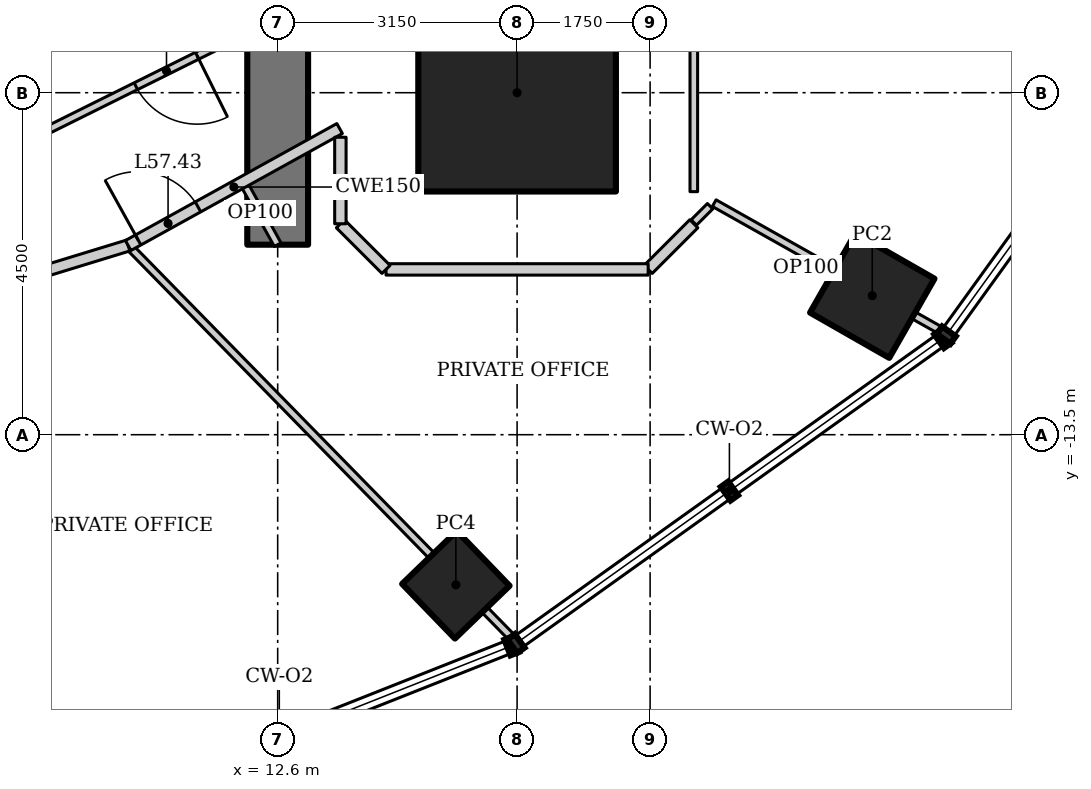
"""IFC4 building model, lengths in metres.
Left out: names, types, materials, properties, quantities, classifications, styles, units other than length and angle.
Written with IfcOpenShell. Run it as: python <this file> out.ifc"""

import sys

from ifc_helpers import new_model, si_unit, direction, frame, frame_2d, origin, origin_2d, place, context, subcontext, project, spatial, rectangle, hollow_rectangle, extrude, element, fill, save


model = new_model("IFC4")
c1 = context("Model", 3, precision=1e-05, world=origin(), true_north=direction((0.0, 1.0)))
c2 = subcontext(c1, "Body", "Model", "MODEL_VIEW")
j1 = project(units=[si_unit("LENGTHUNIT", "METRE"), si_unit("PLANEANGLEUNIT", "RADIAN")], contexts=[c1])
p1 = place(None, origin())
s1 = spatial("IfcSite", under=j1, at=p1, CompositionType="ELEMENT")
p2 = place(p1, origin())
s2 = spatial("IfcBuilding", under=s1, at=p2, CompositionType="ELEMENT")
p3 = place(p2, frame((0.0, 0.0, 245.2)))
s3 = spatial("IfcBuildingStorey", under=s2, at=p3, CompositionType="ELEMENT", Elevation=245.2)
p4 = place(p3, frame((15.75, -9.0, 0.0), z_axis=(0.0, 0.0, 1.0), x_axis=(1.0, 0.0, 0.0)))
e1 = element("IfcColumn", 1, at=p4, inside=s3, PredefinedType="COLUMN", context=c2, shape_type="SweptSolid", body=[
    extrude(hollow_rectangle(XDim=2.6, YDim=2.6, WallThickness=0.13, at=origin_2d()), origin(), (0.0, 0.0, 1.0), 4.2),
])
for number, where, z_axis, x_axis in (
    (2, (9.035, -17.731, 0.0), (0.0, 0.0, 1.0), (0.891, 0.454, 0.0)),
    (3, (14.944, -15.475, 0.0), (0.0, 0.0, 1.0), (0.719, 0.695, 0.0)),
):
    element("IfcColumn", number, at=place(p3, frame(where, z_axis=z_axis, x_axis=x_axis)), inside=s3, PredefinedType="COLUMN", context=c2, shape_type="SweptSolid", body=[
        extrude(hollow_rectangle(XDim=1.0, YDim=1.0, WallThickness=0.08, at=origin_2d()), origin(), (0.0, 0.0, 1.0), 4.2),
    ])
p5 = place(p3, frame((20.423, -11.67, 0.0), z_axis=(0.0, 0.0, 1.0), x_axis=(0.496139221777, 0.86824298017, 0.0)))
e4 = element("IfcColumn", 4, at=p5, inside=s3, PredefinedType="COLUMN", context=c2, shape_type="SweptSolid", body=[
    extrude(hollow_rectangle(XDim=1.2, YDim=1.2, WallThickness=0.1, at=origin_2d()), origin(), (0.0, 0.0, 1.0), 4.2),
])
p6 = place(p3, frame((12.6, -11.0, 0.0), z_axis=(0.0, 0.0, 1.0), x_axis=(0.0, 1.0, 0.0)))
e5 = element("IfcWall", 5, at=p6, inside=s3, PredefinedType="SHEAR", context=c2, shape_type="SweptSolid", body=[
    extrude(rectangle(XDim=22.0, YDim=0.8, at=frame_2d((11.0, 0.0))), origin(), (0.0, 0.0, 1.0), 4.2),
])
p7 = place(p6, frame((10.1, 0.0, 0.0)))
e6 = element("IfcOpeningElement", 6, at=p7, cuts=e5, PredefinedType="OPENING", context=c2, shape_type="SweptSolid", body=[
    extrude(rectangle(XDim=1.8, YDim=2.1, at=frame_2d((0.9, 1.05))), frame((0.0, 0.41, 0.0), z_axis=(0.0, -1.0, 0.0), x_axis=(1.0, 0.0, 0.0)), (0.0, 0.0, 1.0), 0.82),
])
p8 = place(p3, frame((15.709, -16.199, 0.0), z_axis=(0.0, 0.0, 1.0), x_axis=(-0.699362525935, 0.714767135029, 0.0)))
e7 = element("IfcWall", 7, at=p8, inside=s3, PredefinedType="PARTITIONING", context=c2, shape_type="SweptSolid", body=[
    extrude(rectangle(XDim=7.259, YDim=0.1, at=frame_2d((3.629, 0.0))), origin(), (0.0, 0.0, 1.0), 3.41),
])
p9 = place(p3, frame((6.288, -12.341, 0.0), z_axis=(0.0, 0.0, 1.0), x_axis=(0.956185837153, 0.292760388079, 0.0)))
e8 = element("IfcWall", 8, at=p9, inside=s3, PredefinedType="PARTITIONING", context=c2, shape_type="SweptSolid", body=[
    extrude(rectangle(XDim=4.544, YDim=0.15, at=frame_2d((2.272, 0.0))), origin(), (0.0, 0.0, 1.0), 4.05),
])
p10 = place(p9, frame((2.031, 0.0, 0.0)))
e9 = element("IfcOpeningElement", 9, at=p10, cuts=e8, PredefinedType="OPENING", context=c2, shape_type="SweptSolid", body=[
    extrude(rectangle(XDim=0.9, YDim=2.1, at=frame_2d((0.45, 1.05))), frame((0.0, 0.085, 0.0), z_axis=(0.0, -1.0, 0.0), x_axis=(1.0, 0.0, 0.0)), (0.0, 0.0, 1.0), 0.17),
])
p11 = place(p3, frame((12.977, -7.8, 0.0), z_axis=(0.0, 0.0, 1.0), x_axis=(-0.895529831139, -0.445001484874, 0.0)))
e10 = element("IfcWall", 10, at=p11, inside=s3, PredefinedType="PARTITIONING", context=c2, shape_type="SweptSolid", body=[
    extrude(rectangle(XDim=4.108, YDim=0.1, at=frame_2d((2.054, 0.0))), origin(), (0.0, 0.0, 1.0), 4.05),
])
p12 = place(p11, frame((1.604, 0.0, 0.0)))
e11 = element("IfcOpeningElement", 11, at=p12, cuts=e10, PredefinedType="OPENING", context=c2, shape_type="SweptSolid", body=[
    extrude(rectangle(XDim=0.9, YDim=2.1, at=frame_2d((0.45, 1.05))), frame((0.0, 0.06, 0.0), z_axis=(0.0, -1.0, 0.0), x_axis=(1.0, 0.0, 0.0)), (0.0, 0.0, 1.0), 0.12),
])
p13 = place(p3, frame((12.6, -11.0, 0.0), z_axis=(0.0, 0.0, 1.0), x_axis=(-0.484103558985, 0.875010710893, 0.0)))
e12 = element("IfcWall", 12, at=p13, inside=s3, PredefinedType="PARTITIONING", context=c2, shape_type="SweptSolid", body=[
    extrude(rectangle(XDim=0.943, YDim=0.1, at=frame_2d((0.472, 0.0))), origin(), (0.0, 0.0, 1.0), 4.05),
])
p14 = place(p3, frame((21.358, -12.15, 0.0), z_axis=(0.0, 0.0, 1.0), x_axis=(-0.871494482514, 0.49040530885, 0.0)))
e13 = element("IfcWall", 13, at=p14, inside=s3, PredefinedType="PARTITIONING", context=c2, shape_type="SweptSolid", body=[
    extrude(rectangle(XDim=3.459, YDim=0.1, at=frame_2d((1.73, 0.0))), origin(), (0.0, 0.0, 1.0), 3.522),
])
p15 = place(p3, frame((10.633, -11.01, 0.0), z_axis=(0.0, 0.0, 1.0), x_axis=(0.875072100837, 0.483992580869, 0.0)))
e14 = element("IfcWall", 14, at=p15, inside=s3, PredefinedType="PARTITIONING", context=c2, shape_type="SweptSolid", body=[
    extrude(rectangle(XDim=3.179, YDim=0.15, at=frame_2d((1.59, 0.0))), origin(), (0.0, 0.0, 1.0), 4.05),
])
p16 = place(p15, frame((0.15, 0.0, 0.0)))
e15 = element("IfcOpeningElement", 15, at=p16, cuts=e14, PredefinedType="OPENING", context=c2, shape_type="SweptSolid", body=[
    extrude(rectangle(XDim=0.9, YDim=2.1, at=frame_2d((0.45, 1.05))), frame((0.0, 0.085, 0.0), z_axis=(0.0, -1.0, 0.0), x_axis=(1.0, 0.0, 0.0)), (0.0, 0.0, 1.0), 0.17),
])
p17 = place(p3, frame((18.075, -10.725, 0.0), z_axis=(0.0, 0.0, 1.0), x_axis=(-0.707106781187, -0.707106781187, 0.0)))
e16 = element("IfcWall", 16, at=p17, inside=s3, PredefinedType="PARTITIONING", context=c2, shape_type="SweptSolid", body=[
    extrude(rectangle(XDim=0.849, YDim=0.15, at=frame_2d((0.425, 0.0))), origin(), (0.0, 0.0, 1.0), 4.05),
])
p18 = place(p3, frame((17.475, -11.325, 0.0), z_axis=(0.0, 0.0, 1.0), x_axis=(-1.0, 0.0, 0.0)))
e17 = element("IfcWall", 17, at=p18, inside=s3, PredefinedType="PARTITIONING", context=c2, shape_type="SweptSolid", body=[
    extrude(rectangle(XDim=3.449, YDim=0.15, at=frame_2d((1.725, 0.0))), origin(), (0.0, 0.0, 1.0), 4.05),
])
p19 = place(p3, frame((14.025, -11.325, 0.0), z_axis=(0.0, 0.0, 1.0), x_axis=(-0.707106781187, 0.707106781187, 0.0)))
e18 = element("IfcWall", 18, at=p19, inside=s3, PredefinedType="PARTITIONING", context=c2, shape_type="SweptSolid", body=[
    extrude(rectangle(XDim=0.849, YDim=0.15, at=frame_2d((0.425, 0.0))), origin(), (0.0, 0.0, 1.0), 4.05),
])
p20 = place(p3, frame((13.425, -10.725, 0.0), z_axis=(0.0, 0.0, 1.0), x_axis=(0.0, 1.0, 0.0)))
e19 = element("IfcWall", 19, at=p20, inside=s3, PredefinedType="PARTITIONING", context=c2, shape_type="SweptSolid", body=[
    extrude(rectangle(XDim=1.138, YDim=0.15, at=frame_2d((0.569, 0.0))), origin(), (0.0, 0.0, 1.0), 4.05),
])
p21 = place(p3, frame((18.289, -10.493, 0.0), z_axis=(0.0, 0.0, 1.0), x_axis=(-0.707509576179, -0.706703756616, 0.0)))
e20 = element("IfcWall", 20, at=p21, inside=s3, PredefinedType="PARTITIONING", context=c2, shape_type="SweptSolid", body=[
    extrude(rectangle(XDim=0.303, YDim=0.1, at=frame_2d((0.151, 0.0))), origin(), (0.0, 0.0, 1.0), 4.05),
])
p22 = place(p3, frame((18.075, -7.275, 0.0), z_axis=(0.0, 0.0, 1.0), x_axis=(0.0, -1.0, 0.0)))
e21 = element("IfcWall", 21, at=p22, inside=s3, PredefinedType="PARTITIONING", context=c2, shape_type="SweptSolid", body=[
    extrude(rectangle(XDim=3.027, YDim=0.1, at=frame_2d((1.513, 0.0))), origin(), (0.0, 0.0, 1.0), 3.601),
])
p23 = place(p12, origin())
e22 = element("IfcDoor", 22, at=p23, inside=s3, OperationType="SINGLE_SWING_LEFT", PredefinedType="DOOR", context=c2, shape_type="SweptSolid", body=[
    extrude(rectangle(XDim=0.9, YDim=2.1, at=frame_2d((0.45, 1.05))), frame((0.0, 0.025, 0.0), z_axis=(0.0, -1.0, 0.0), x_axis=(1.0, 0.0, 0.0)), (0.0, 0.0, 1.0), 0.05),
])
fill(e11, e22)
p24 = place(p16, origin())
e23 = element("IfcDoor", 23, at=p24, inside=s3, OperationType="SINGLE_SWING_LEFT", PredefinedType="DOOR", context=c2, shape_type="SweptSolid", body=[
    extrude(rectangle(XDim=0.9, YDim=2.1, at=frame_2d((0.45, 1.05))), frame((0.0, 0.025, 0.0), z_axis=(0.0, -1.0, 0.0), x_axis=(1.0, 0.0, 0.0)), (0.0, 0.0, 1.0), 0.05),
])
fill(e15, e23)
save(model, sys.argv[1])
